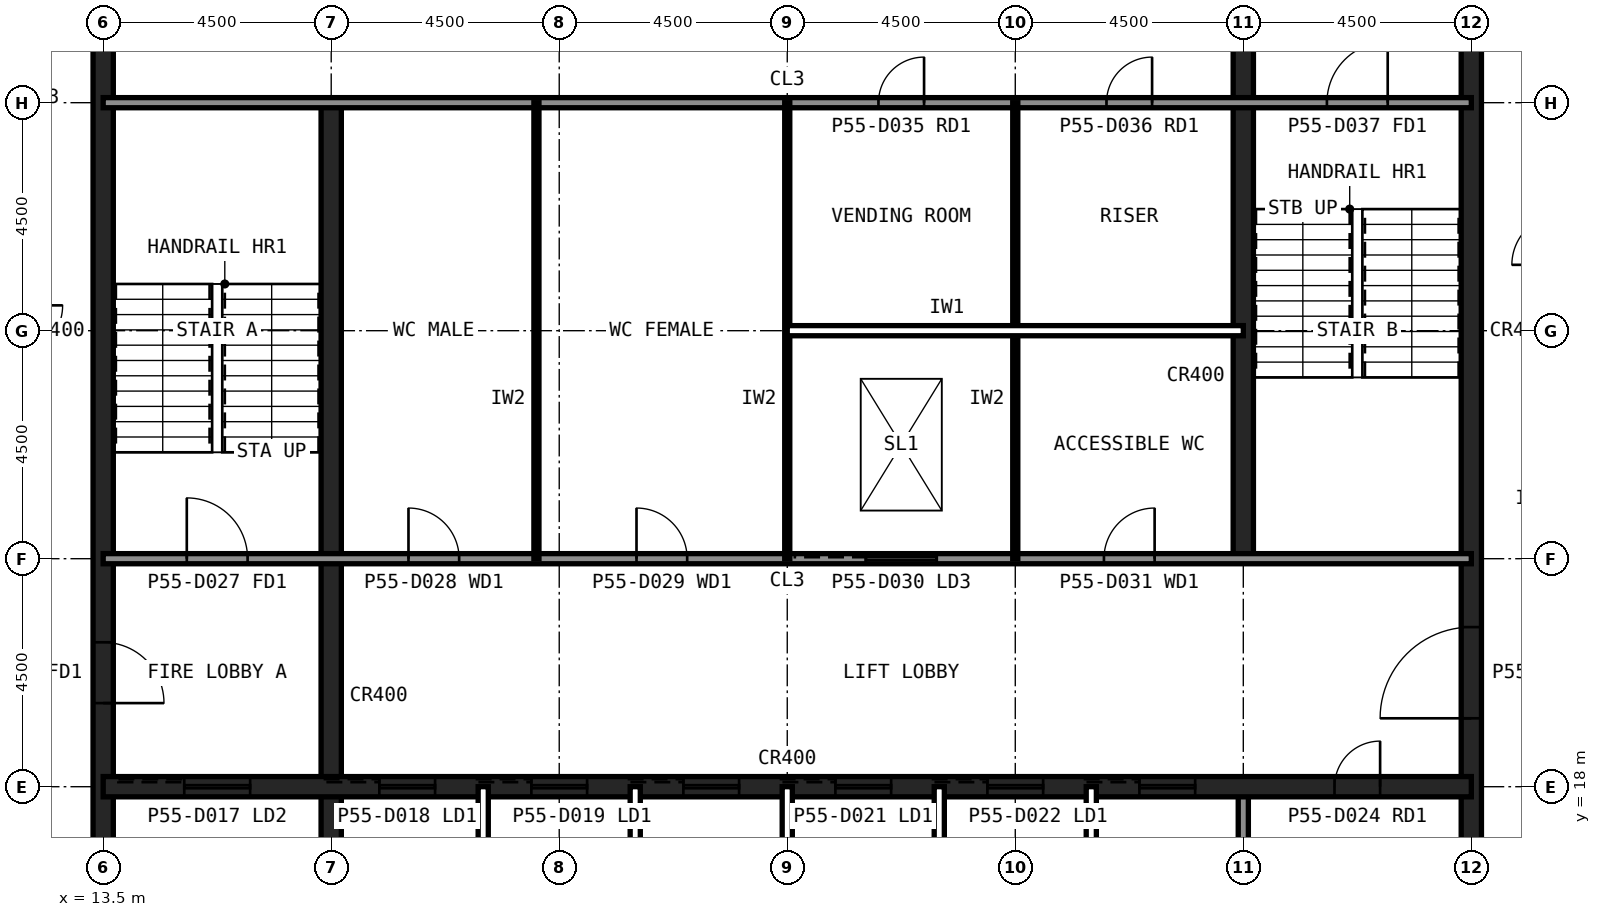
"""IFC4 building model, lengths in metres.
Left out: names, types, materials, properties, quantities, classifications, styles, units other than length and angle.
Written with IfcOpenShell. Run it as: python <this file> out.ifc"""

import sys

from ifc_helpers import new_model, si_unit, direction, frame, frame_2d, origin, place, context, subcontext, project, spatial, rectangle, extrude, element, fill, save


model = new_model("IFC4")
c1 = context("Model", 3, precision=1e-05, world=origin(), true_north=direction((0.0, 1.0)))
c2 = subcontext(c1, "Body", "Model", "MODEL_VIEW")
j1 = project(units=[si_unit("LENGTHUNIT", "METRE"), si_unit("PLANEANGLEUNIT", "RADIAN")], contexts=[c1])
p1 = place(None, origin())
s1 = spatial("IfcSite", under=j1, at=p1, CompositionType="ELEMENT")
p2 = place(p1, origin())
s2 = spatial("IfcBuilding", under=s1, at=p2, CompositionType="ELEMENT")
p3 = place(p2, frame((0.0, 0.0, 230.6)))
s3 = spatial("IfcBuildingStorey", under=s2, at=p3, CompositionType="ELEMENT", Elevation=230.6)
p4 = place(p3, frame((40.5, 13.5, 0.0), z_axis=(0.0, 0.0, 1.0), x_axis=(0.0, 1.0, 0.0)))
e1 = element("IfcWall", 1, at=p4, inside=s3, PredefinedType="SHEAR", context=c2, shape_type="SweptSolid", body=[
    extrude(rectangle(XDim=27.0, YDim=0.4, at=frame_2d((13.5, 0.0))), origin(), (0.0, 0.0, 1.0), 4.0),
])
p5 = place(p4, frame((5.85, 0.0, 0.0)))
e2 = element("IfcOpeningElement", 2, at=p5, cuts=e1, PredefinedType="OPENING", context=c2, shape_type="SweptSolid", body=[
    extrude(rectangle(XDim=1.8, YDim=2.1, at=frame_2d((0.9, 1.05))), frame((0.0, 0.21, 0.0), z_axis=(0.0, -1.0, 0.0), x_axis=(1.0, 0.0, 0.0)), (0.0, 0.0, 1.0), 0.42),
])
p6 = place(p4, frame((19.65, 0.0, 0.0)))
e3 = element("IfcOpeningElement", 3, at=p6, cuts=e1, PredefinedType="OPENING", context=c2, shape_type="SweptSolid", body=[
    extrude(rectangle(XDim=1.2, YDim=2.1, at=frame_2d((0.6, 1.05))), frame((0.0, 0.21, 0.0), z_axis=(0.0, -1.0, 0.0), x_axis=(1.0, 0.0, 0.0)), (0.0, 0.0, 1.0), 0.42),
])
p7 = place(p3, frame((13.5, 40.5, 0.0), z_axis=(0.0, 0.0, 1.0), x_axis=(0.0, -1.0, 0.0)))
e4 = element("IfcWall", 4, at=p7, inside=s3, PredefinedType="SHEAR", context=c2, shape_type="SweptSolid", body=[
    extrude(rectangle(XDim=27.0, YDim=0.4, at=frame_2d((13.5, 0.0))), origin(), (0.0, 0.0, 1.0), 4.0),
])
p8 = place(p7, frame((19.65, 0.0, 0.0)))
e5 = element("IfcOpeningElement", 5, at=p8, cuts=e4, PredefinedType="OPENING", context=c2, shape_type="SweptSolid", body=[
    extrude(rectangle(XDim=1.2, YDim=2.1, at=frame_2d((0.6, 1.05))), frame((0.0, 0.21, 0.0), z_axis=(0.0, -1.0, 0.0), x_axis=(1.0, 0.0, 0.0)), (0.0, 0.0, 1.0), 0.42),
])
p9 = place(p7, frame((5.85, 0.0, 0.0)))
e6 = element("IfcOpeningElement", 6, at=p9, cuts=e4, PredefinedType="OPENING", context=c2, shape_type="SweptSolid", body=[
    extrude(rectangle(XDim=1.8, YDim=2.1, at=frame_2d((0.9, 1.05))), frame((0.0, 0.21, 0.0), z_axis=(0.0, -1.0, 0.0), x_axis=(1.0, 0.0, 0.0)), (0.0, 0.0, 1.0), 0.42),
])
p10 = place(p3, frame((18.0, 13.5, 0.0), z_axis=(0.0, 0.0, 1.0), x_axis=(0.0, 1.0, 0.0)))
e7 = element("IfcWall", 7, at=p10, inside=s3, PredefinedType="SHEAR", context=c2, shape_type="SweptSolid", body=[
    extrude(rectangle(XDim=18.0, YDim=0.4, at=frame_2d((9.0, 0.0))), origin(), (0.0, 0.0, 1.0), 4.0),
])
p11 = place(p3, frame((36.0, 13.5, 0.0), z_axis=(0.0, 0.0, 1.0), x_axis=(0.0, 1.0, 0.0)))
e8 = element("IfcWall", 8, at=p11, inside=s3, PredefinedType="SOLIDWALL", context=c2, shape_type="SweptSolid", body=[
    extrude(rectangle(XDim=4.5, YDim=0.2, at=frame_2d((2.25, 0.0))), origin(), (0.0, 0.0, 1.0), 3.84),
])
p12 = place(p3, frame((36.0, 22.5, 0.0), z_axis=(0.0, 0.0, 1.0), x_axis=(0.0, 1.0, 0.0)))
e9 = element("IfcWall", 9, at=p12, inside=s3, PredefinedType="SHEAR", context=c2, shape_type="SweptSolid", body=[
    extrude(rectangle(XDim=18.0, YDim=0.4, at=frame_2d((9.0, 0.0))), origin(), (0.0, 0.0, 1.0), 4.0),
])
p13 = place(p3, frame((13.5, 18.0, 0.0), z_axis=(0.0, 0.0, 1.0), x_axis=(1.0, 0.0, 0.0)))
e10 = element("IfcWall", 10, at=p13, inside=s3, PredefinedType="SHEAR", context=c2, shape_type="SweptSolid", body=[
    extrude(rectangle(XDim=27.0, YDim=0.4, at=frame_2d((13.5, 0.0))), origin(), (0.0, 0.0, 1.0), 4.0),
])
p14 = place(p13, frame((24.3, 0.0, 0.0)))
e11 = element("IfcOpeningElement", 11, at=p14, cuts=e10, PredefinedType="OPENING", context=c2, shape_type="SweptSolid", body=[
    extrude(rectangle(XDim=0.9, YDim=2.1, at=frame_2d((0.45, 1.05))), frame((0.0, 0.21, 0.0), z_axis=(0.0, -1.0, 0.0), x_axis=(1.0, 0.0, 0.0)), (0.0, 0.0, 1.0), 0.42),
])
p15 = place(p13, frame((5.45, 0.0, 0.0)))
e12 = element("IfcOpeningElement", 12, at=p15, cuts=e10, PredefinedType="OPENING", context=c2, shape_type="SweptSolid", body=[
    extrude(rectangle(XDim=1.1, YDim=2.1, at=frame_2d((0.55, 1.05))), frame((0.0, 0.21, 0.0), z_axis=(0.0, -1.0, 0.0), x_axis=(1.0, 0.0, 0.0)), (0.0, 0.0, 1.0), 0.42),
])
p16 = place(p13, frame((8.45, 0.0, 0.0)))
e13 = element("IfcOpeningElement", 13, at=p16, cuts=e10, PredefinedType="OPENING", context=c2, shape_type="SweptSolid", body=[
    extrude(rectangle(XDim=1.1, YDim=2.1, at=frame_2d((0.55, 1.05))), frame((0.0, 0.21, 0.0), z_axis=(0.0, -1.0, 0.0), x_axis=(1.0, 0.0, 0.0)), (0.0, 0.0, 1.0), 0.42),
])
p17 = place(p13, frame((11.45, 0.0, 0.0)))
e14 = element("IfcOpeningElement", 14, at=p17, cuts=e10, PredefinedType="OPENING", context=c2, shape_type="SweptSolid", body=[
    extrude(rectangle(XDim=1.1, YDim=2.1, at=frame_2d((0.55, 1.05))), frame((0.0, 0.21, 0.0), z_axis=(0.0, -1.0, 0.0), x_axis=(1.0, 0.0, 0.0)), (0.0, 0.0, 1.0), 0.42),
])
p18 = place(p13, frame((14.45, 0.0, 0.0)))
e15 = element("IfcOpeningElement", 15, at=p18, cuts=e10, PredefinedType="OPENING", context=c2, shape_type="SweptSolid", body=[
    extrude(rectangle(XDim=1.1, YDim=2.1, at=frame_2d((0.55, 1.05))), frame((0.0, 0.21, 0.0), z_axis=(0.0, -1.0, 0.0), x_axis=(1.0, 0.0, 0.0)), (0.0, 0.0, 1.0), 0.42),
])
p19 = place(p13, frame((17.45, 0.0, 0.0)))
e16 = element("IfcOpeningElement", 16, at=p19, cuts=e10, PredefinedType="OPENING", context=c2, shape_type="SweptSolid", body=[
    extrude(rectangle(XDim=1.1, YDim=2.1, at=frame_2d((0.55, 1.05))), frame((0.0, 0.21, 0.0), z_axis=(0.0, -1.0, 0.0), x_axis=(1.0, 0.0, 0.0)), (0.0, 0.0, 1.0), 0.42),
])
p20 = place(p13, frame((20.45, 0.0, 0.0)))
e17 = element("IfcOpeningElement", 17, at=p20, cuts=e10, PredefinedType="OPENING", context=c2, shape_type="SweptSolid", body=[
    extrude(rectangle(XDim=1.1, YDim=2.1, at=frame_2d((0.55, 1.05))), frame((0.0, 0.21, 0.0), z_axis=(0.0, -1.0, 0.0), x_axis=(1.0, 0.0, 0.0)), (0.0, 0.0, 1.0), 0.42),
])
p21 = place(p13, frame((1.6, 0.0, 0.0)))
e18 = element("IfcOpeningElement", 18, at=p21, cuts=e10, PredefinedType="OPENING", context=c2, shape_type="SweptSolid", body=[
    extrude(rectangle(XDim=1.3, YDim=2.2, at=frame_2d((0.65, 1.1))), frame((0.0, 0.21, 0.0), z_axis=(0.0, -1.0, 0.0), x_axis=(1.0, 0.0, 0.0)), (0.0, 0.0, 1.0), 0.42),
])
p22 = place(p3, frame((13.5, 22.5, 0.0), z_axis=(0.0, 0.0, 1.0), x_axis=(1.0, 0.0, 0.0)))
e19 = element("IfcWall", 19, at=p22, inside=s3, PredefinedType="SOLIDWALL", context=c2, shape_type="SweptSolid", body=[
    extrude(rectangle(XDim=27.0, YDim=0.2, at=frame_2d((13.5, 0.0))), origin(), (0.0, 0.0, 1.0), 3.84),
])
p23 = place(p22, frame((1.65, 0.0, 0.0)))
e20 = element("IfcOpeningElement", 20, at=p23, cuts=e19, PredefinedType="OPENING", context=c2, shape_type="SweptSolid", body=[
    extrude(rectangle(XDim=1.2, YDim=2.1, at=frame_2d((0.6, 1.05))), frame((0.0, 0.11, 0.0), z_axis=(0.0, -1.0, 0.0), x_axis=(1.0, 0.0, 0.0)), (0.0, 0.0, 1.0), 0.22),
])
p24 = place(p22, frame((6.025, 0.0, 0.0)))
e21 = element("IfcOpeningElement", 21, at=p24, cuts=e19, PredefinedType="OPENING", context=c2, shape_type="SweptSolid", body=[
    extrude(rectangle(XDim=1.0, YDim=2.1, at=frame_2d((0.5, 1.05))), frame((0.0, 0.11, 0.0), z_axis=(0.0, -1.0, 0.0), x_axis=(1.0, 0.0, 0.0)), (0.0, 0.0, 1.0), 0.22),
])
p25 = place(p22, frame((10.525, 0.0, 0.0)))
e22 = element("IfcOpeningElement", 22, at=p25, cuts=e19, PredefinedType="OPENING", context=c2, shape_type="SweptSolid", body=[
    extrude(rectangle(XDim=1.0, YDim=2.1, at=frame_2d((0.5, 1.05))), frame((0.0, 0.11, 0.0), z_axis=(0.0, -1.0, 0.0), x_axis=(1.0, 0.0, 0.0)), (0.0, 0.0, 1.0), 0.22),
])
p26 = place(p22, frame((19.75, 0.0, 0.0)))
e23 = element("IfcOpeningElement", 23, at=p26, cuts=e19, PredefinedType="OPENING", context=c2, shape_type="SweptSolid", body=[
    extrude(rectangle(XDim=1.0, YDim=2.1, at=frame_2d((0.5, 1.05))), frame((0.0, 0.11, 0.0), z_axis=(0.0, -1.0, 0.0), x_axis=(1.0, 0.0, 0.0)), (0.0, 0.0, 1.0), 0.22),
])
p27 = place(p22, frame((15.05, 0.0, 0.0)))
e24 = element("IfcOpeningElement", 24, at=p27, cuts=e19, PredefinedType="OPENING", context=c2, shape_type="SweptSolid", body=[
    extrude(rectangle(XDim=1.4, YDim=2.4, at=frame_2d((0.7, 1.2))), frame((0.0, 0.11, 0.0), z_axis=(0.0, -1.0, 0.0), x_axis=(1.0, 0.0, 0.0)), (0.0, 0.0, 1.0), 0.22),
])
p28 = place(p3, frame((13.5, 31.5, 0.0), z_axis=(0.0, 0.0, 1.0), x_axis=(1.0, 0.0, 0.0)))
e25 = element("IfcWall", 25, at=p28, inside=s3, PredefinedType="SOLIDWALL", context=c2, shape_type="SweptSolid", body=[
    extrude(rectangle(XDim=27.0, YDim=0.2, at=frame_2d((13.5, 0.0))), origin(), (0.0, 0.0, 1.0), 3.84),
])
p29 = place(p28, frame((24.15, 0.0, 0.0)))
e26 = element("IfcOpeningElement", 26, at=p29, cuts=e25, PredefinedType="OPENING", context=c2, shape_type="SweptSolid", body=[
    extrude(rectangle(XDim=1.2, YDim=2.1, at=frame_2d((0.6, 1.05))), frame((0.0, 0.11, 0.0), z_axis=(0.0, -1.0, 0.0), x_axis=(1.0, 0.0, 0.0)), (0.0, 0.0, 1.0), 0.22),
])
p30 = place(p28, frame((15.3, 0.0, 0.0)))
e27 = element("IfcOpeningElement", 27, at=p30, cuts=e25, PredefinedType="OPENING", context=c2, shape_type="SweptSolid", body=[
    extrude(rectangle(XDim=0.9, YDim=2.1, at=frame_2d((0.45, 1.05))), frame((0.0, 0.11, 0.0), z_axis=(0.0, -1.0, 0.0), x_axis=(1.0, 0.0, 0.0)), (0.0, 0.0, 1.0), 0.22),
])
p31 = place(p28, frame((19.8, 0.0, 0.0)))
e28 = element("IfcOpeningElement", 28, at=p31, cuts=e25, PredefinedType="OPENING", context=c2, shape_type="SweptSolid", body=[
    extrude(rectangle(XDim=0.9, YDim=2.1, at=frame_2d((0.45, 1.05))), frame((0.0, 0.11, 0.0), z_axis=(0.0, -1.0, 0.0), x_axis=(1.0, 0.0, 0.0)), (0.0, 0.0, 1.0), 0.22),
])
for number, where, z_axis, x_axis in (
    (29, (21.0, 13.5, 0.0), (0.0, 0.0, 1.0), (0.0, 1.0, 0.0)),
    (30, (24.0, 13.5, 0.0), (0.0, 0.0, 1.0), (0.0, 1.0, 0.0)),
    (31, (27.0, 13.5, 0.0), (0.0, 0.0, 1.0), (0.0, 1.0, 0.0)),
    (32, (30.0, 13.5, 0.0), (0.0, 0.0, 1.0), (0.0, 1.0, 0.0)),
    (33, (33.0, 13.5, 0.0), (0.0, 0.0, 1.0), (0.0, 1.0, 0.0)),
):
    element("IfcWall", number, at=place(p3, frame(where, z_axis=z_axis, x_axis=x_axis)), inside=s3, PredefinedType="PARTITIONING", context=c2, shape_type="SweptSolid", body=[
        extrude(rectangle(XDim=4.5, YDim=0.2, at=frame_2d((2.25, 0.0))), origin(), (0.0, 0.0, 1.0), 3.84),
    ])
for number, where, z_axis, x_axis in (
    (34, (22.05, 22.5, 0.0), (0.0, 0.0, 1.0), (0.0, 1.0, 0.0)),
    (35, (27.0, 22.5, 0.0), (0.0, 0.0, 1.0), (0.0, 1.0, 0.0)),
    (36, (31.5, 22.5, 0.0), (0.0, 0.0, 1.0), (0.0, 1.0, 0.0)),
):
    element("IfcWall", number, at=place(p3, frame(where, z_axis=z_axis, x_axis=x_axis)), inside=s3, PredefinedType="PLUMBINGWALL", context=c2, shape_type="SweptSolid", body=[
        extrude(rectangle(XDim=9.0, YDim=0.1, at=frame_2d((4.5, 0.0))), origin(), (0.0, 0.0, 1.0), 3.84),
    ])
p32 = place(p3, frame((27.0, 27.0, 0.0), z_axis=(0.0, 0.0, 1.0), x_axis=(1.0, 0.0, 0.0)))
e37 = element("IfcWall", 37, at=p32, inside=s3, PredefinedType="PARTITIONING", context=c2, shape_type="SweptSolid", body=[
    extrude(rectangle(XDim=9.0, YDim=0.2, at=frame_2d((4.5, 0.0))), origin(), (0.0, 0.0, 1.0), 3.84),
])
p33 = place(p8, origin())
e38 = element("IfcDoor", 38, at=p33, inside=s3, OperationType="SINGLE_SWING_RIGHT", PredefinedType="DOOR", context=c2, shape_type="SweptSolid", body=[
    extrude(rectangle(XDim=1.2, YDim=2.1, at=frame_2d((0.6, 1.05))), frame((0.0, 0.025, 0.0), z_axis=(0.0, -1.0, 0.0), x_axis=(1.0, 0.0, 0.0)), (0.0, 0.0, 1.0), 0.05),
])
fill(e5, e38)
p34 = place(p5, origin())
e39 = element("IfcDoor", 39, at=p34, inside=s3, OperationType="SINGLE_SWING_LEFT", PredefinedType="DOOR", context=c2, shape_type="SweptSolid", body=[
    extrude(rectangle(XDim=1.8, YDim=2.1, at=frame_2d((0.9, 1.05))), frame((0.0, 0.025, 0.0), z_axis=(0.0, -1.0, 0.0), x_axis=(1.0, 0.0, 0.0)), (0.0, 0.0, 1.0), 0.05),
])
fill(e2, e39)
p35 = place(p23, origin())
e40 = element("IfcDoor", 40, at=p35, inside=s3, OperationType="SINGLE_SWING_LEFT", PredefinedType="DOOR", context=c2, shape_type="SweptSolid", body=[
    extrude(rectangle(XDim=1.2, YDim=2.1, at=frame_2d((0.6, 1.05))), frame((0.0, 0.025, 0.0), z_axis=(0.0, -1.0, 0.0), x_axis=(1.0, 0.0, 0.0)), (0.0, 0.0, 1.0), 0.05),
])
fill(e20, e40)
p36 = place(p29, origin())
e41 = element("IfcDoor", 41, at=p36, inside=s3, OperationType="SINGLE_SWING_RIGHT", PredefinedType="DOOR", context=c2, shape_type="SweptSolid", body=[
    extrude(rectangle(XDim=1.2, YDim=2.1, at=frame_2d((0.6, 1.05))), frame((0.0, 0.025, 0.0), z_axis=(0.0, -1.0, 0.0), x_axis=(1.0, 0.0, 0.0)), (0.0, 0.0, 1.0), 0.05),
])
fill(e26, e41)
p37 = place(p24, origin())
e42 = element("IfcDoor", 42, at=p37, inside=s3, OperationType="SINGLE_SWING_LEFT", PredefinedType="DOOR", context=c2, shape_type="SweptSolid", body=[
    extrude(rectangle(XDim=1.0, YDim=2.1, at=frame_2d((0.5, 1.05))), frame((0.0, 0.025, 0.0), z_axis=(0.0, -1.0, 0.0), x_axis=(1.0, 0.0, 0.0)), (0.0, 0.0, 1.0), 0.05),
])
fill(e21, e42)
p38 = place(p25, origin())
e43 = element("IfcDoor", 43, at=p38, inside=s3, OperationType="SINGLE_SWING_LEFT", PredefinedType="DOOR", context=c2, shape_type="SweptSolid", body=[
    extrude(rectangle(XDim=1.0, YDim=2.1, at=frame_2d((0.5, 1.05))), frame((0.0, 0.025, 0.0), z_axis=(0.0, -1.0, 0.0), x_axis=(1.0, 0.0, 0.0)), (0.0, 0.0, 1.0), 0.05),
])
fill(e22, e43)
p39 = place(p26, origin())
e44 = element("IfcDoor", 44, at=p39, inside=s3, OperationType="SINGLE_SWING_RIGHT", PredefinedType="DOOR", context=c2, shape_type="SweptSolid", body=[
    extrude(rectangle(XDim=1.0, YDim=2.1, at=frame_2d((0.5, 1.05))), frame((0.0, 0.025, 0.0), z_axis=(0.0, -1.0, 0.0), x_axis=(1.0, 0.0, 0.0)), (0.0, 0.0, 1.0), 0.05),
])
fill(e23, e44)
p40 = place(p30, origin())
e45 = element("IfcDoor", 45, at=p40, inside=s3, OperationType="SINGLE_SWING_RIGHT", PredefinedType="DOOR", context=c2, shape_type="SweptSolid", body=[
    extrude(rectangle(XDim=0.9, YDim=2.1, at=frame_2d((0.45, 1.05))), frame((0.0, 0.025, 0.0), z_axis=(0.0, -1.0, 0.0), x_axis=(1.0, 0.0, 0.0)), (0.0, 0.0, 1.0), 0.05),
])
fill(e27, e45)
p41 = place(p31, origin())
e46 = element("IfcDoor", 46, at=p41, inside=s3, OperationType="SINGLE_SWING_RIGHT", PredefinedType="DOOR", context=c2, shape_type="SweptSolid", body=[
    extrude(rectangle(XDim=0.9, YDim=2.1, at=frame_2d((0.45, 1.05))), frame((0.0, 0.025, 0.0), z_axis=(0.0, -1.0, 0.0), x_axis=(1.0, 0.0, 0.0)), (0.0, 0.0, 1.0), 0.05),
])
fill(e28, e46)
p42 = place(p14, origin())
e47 = element("IfcDoor", 47, at=p42, inside=s3, OperationType="SINGLE_SWING_RIGHT", PredefinedType="DOOR", context=c2, shape_type="SweptSolid", body=[
    extrude(rectangle(XDim=0.9, YDim=2.1, at=frame_2d((0.45, 1.05))), frame((0.0, 0.025, 0.0), z_axis=(0.0, -1.0, 0.0), x_axis=(1.0, 0.0, 0.0)), (0.0, 0.0, 1.0), 0.05),
])
fill(e11, e47)
p43 = place(p15, origin())
e48 = element("IfcDoor", 48, at=p43, inside=s3, OperationType="SLIDING_TO_LEFT", PredefinedType="DOOR", context=c2, shape_type="SweptSolid", body=[
    extrude(rectangle(XDim=1.1, YDim=2.1, at=frame_2d((0.55, 1.05))), frame((0.0, 0.025, 0.0), z_axis=(0.0, -1.0, 0.0), x_axis=(1.0, 0.0, 0.0)), (0.0, 0.0, 1.0), 0.05),
])
fill(e12, e48)
p44 = place(p16, origin())
e49 = element("IfcDoor", 49, at=p44, inside=s3, OperationType="SLIDING_TO_LEFT", PredefinedType="DOOR", context=c2, shape_type="SweptSolid", body=[
    extrude(rectangle(XDim=1.1, YDim=2.1, at=frame_2d((0.55, 1.05))), frame((0.0, 0.025, 0.0), z_axis=(0.0, -1.0, 0.0), x_axis=(1.0, 0.0, 0.0)), (0.0, 0.0, 1.0), 0.05),
])
fill(e13, e49)
p45 = place(p17, origin())
e50 = element("IfcDoor", 50, at=p45, inside=s3, OperationType="SLIDING_TO_LEFT", PredefinedType="DOOR", context=c2, shape_type="SweptSolid", body=[
    extrude(rectangle(XDim=1.1, YDim=2.1, at=frame_2d((0.55, 1.05))), frame((0.0, 0.025, 0.0), z_axis=(0.0, -1.0, 0.0), x_axis=(1.0, 0.0, 0.0)), (0.0, 0.0, 1.0), 0.05),
])
fill(e14, e50)
p46 = place(p18, origin())
e51 = element("IfcDoor", 51, at=p46, inside=s3, OperationType="SLIDING_TO_LEFT", PredefinedType="DOOR", context=c2, shape_type="SweptSolid", body=[
    extrude(rectangle(XDim=1.1, YDim=2.1, at=frame_2d((0.55, 1.05))), frame((0.0, 0.025, 0.0), z_axis=(0.0, -1.0, 0.0), x_axis=(1.0, 0.0, 0.0)), (0.0, 0.0, 1.0), 0.05),
])
fill(e15, e51)
p47 = place(p19, origin())
e52 = element("IfcDoor", 52, at=p47, inside=s3, OperationType="SLIDING_TO_LEFT", PredefinedType="DOOR", context=c2, shape_type="SweptSolid", body=[
    extrude(rectangle(XDim=1.1, YDim=2.1, at=frame_2d((0.55, 1.05))), frame((0.0, 0.025, 0.0), z_axis=(0.0, -1.0, 0.0), x_axis=(1.0, 0.0, 0.0)), (0.0, 0.0, 1.0), 0.05),
])
fill(e16, e52)
p48 = place(p20, origin())
e53 = element("IfcDoor", 53, at=p48, inside=s3, OperationType="SLIDING_TO_LEFT", PredefinedType="DOOR", context=c2, shape_type="SweptSolid", body=[
    extrude(rectangle(XDim=1.1, YDim=2.1, at=frame_2d((0.55, 1.05))), frame((0.0, 0.025, 0.0), z_axis=(0.0, -1.0, 0.0), x_axis=(1.0, 0.0, 0.0)), (0.0, 0.0, 1.0), 0.05),
])
fill(e17, e53)
p49 = place(p21, origin())
e54 = element("IfcDoor", 54, at=p49, inside=s3, OperationType="SLIDING_TO_LEFT", PredefinedType="DOOR", context=c2, shape_type="SweptSolid", body=[
    extrude(rectangle(XDim=1.3, YDim=2.2, at=frame_2d((0.65, 1.1))), frame((0.0, 0.025, 0.0), z_axis=(0.0, -1.0, 0.0), x_axis=(1.0, 0.0, 0.0)), (0.0, 0.0, 1.0), 0.05),
])
fill(e18, e54)
p50 = place(p27, origin())
e55 = element("IfcDoor", 55, at=p50, inside=s3, OperationType="SLIDING_TO_LEFT", PredefinedType="DOOR", context=c2, shape_type="SweptSolid", body=[
    extrude(rectangle(XDim=1.4, YDim=2.4, at=frame_2d((0.7, 1.2))), frame((0.0, 0.025, 0.0), z_axis=(0.0, -1.0, 0.0), x_axis=(1.0, 0.0, 0.0)), (0.0, 0.0, 1.0), 0.05),
])
fill(e24, e55)
save(model, sys.argv[1])
